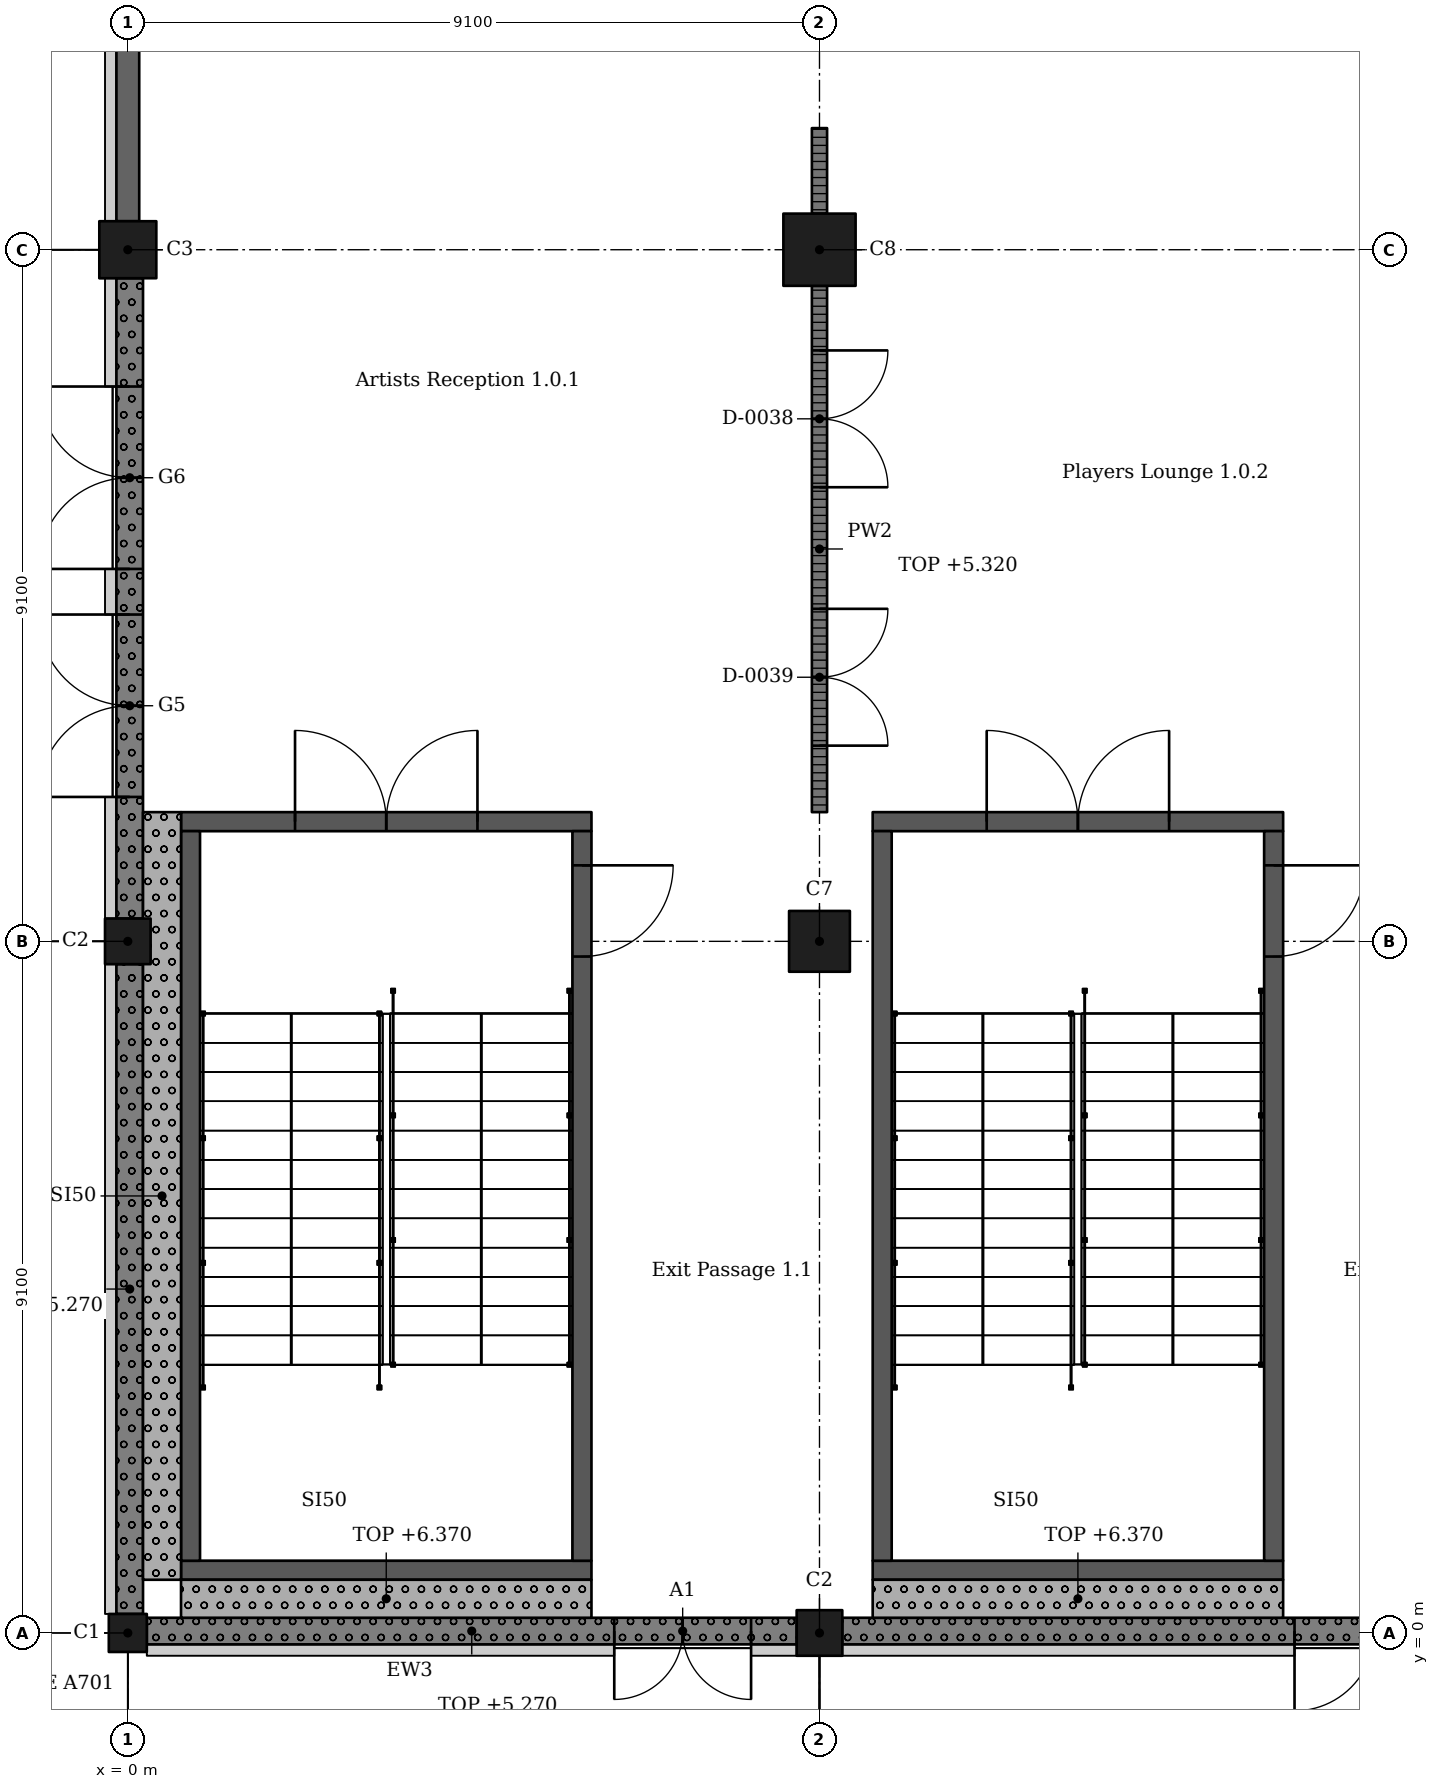
"""IFC4 building model, lengths in metres.
Left out: names, types, materials, properties, quantities, classifications, styles, units other than length and angle.
Written with IfcOpenShell. Run it as: python <this file> out.ifc"""

import sys

from ifc_helpers import new_model, si_unit, direction, frame, frame_2d, origin, origin_2d, place, context, subcontext, project, spatial, rectangle, extrude, element, fill, save


model = new_model("IFC4")
c1 = context("Model", 3, precision=1e-05, world=origin(), true_north=direction((0.0, 1.0)))
c2 = subcontext(c1, "Body", "Model", "MODEL_VIEW")
j1 = project(units=[si_unit("LENGTHUNIT", "METRE"), si_unit("PLANEANGLEUNIT", "RADIAN")], contexts=[c1])
p1 = place(None, origin())
s1 = spatial("IfcSite", under=j1, at=p1, CompositionType="ELEMENT")
p2 = place(p1, origin())
s2 = spatial("IfcBuilding", under=s1, at=p2, CompositionType="ELEMENT")
p3 = place(p2, origin())
s3 = spatial("IfcBuildingStorey", under=s2, at=p3, CompositionType="ELEMENT", Elevation=0.0)
p4 = place(p3, frame((0.0, 0.0, -0.4), z_axis=(0.0, 0.0, 1.0), x_axis=(1.0, 0.0, 0.0)))
e1 = element("IfcColumn", 1, at=p4, inside=s3, PredefinedType="COLUMN", context=c2, shape_type="SweptSolid", body=[
    extrude(rectangle(XDim=0.5, YDim=0.5, at=origin_2d()), origin(), (0.0, 0.0, 1.0), 6.77),
])
p5 = place(p3, frame((0.0, 9.1, -0.4), z_axis=(0.0, 0.0, 1.0), x_axis=(1.0, 0.0, 0.0)))
e2 = element("IfcColumn", 2, at=p5, inside=s3, PredefinedType="COLUMN", context=c2, shape_type="SweptSolid", body=[
    extrude(rectangle(XDim=0.6, YDim=0.6, at=origin_2d()), origin(), (0.0, 0.0, 1.0), 6.77),
])
p6 = place(p3, frame((0.0, 18.2, -0.4), z_axis=(0.0, 0.0, 1.0), x_axis=(1.0, 0.0, 0.0)))
e3 = element("IfcColumn", 3, at=p6, inside=s3, PredefinedType="COLUMN", context=c2, shape_type="SweptSolid", body=[
    extrude(rectangle(XDim=0.75, YDim=0.75, at=origin_2d()), origin(), (0.0, 0.0, 1.0), 6.77),
])
p7 = place(p3, frame((9.1, 0.0, -0.4), z_axis=(0.0, 0.0, 1.0), x_axis=(1.0, 0.0, 0.0)))
e4 = element("IfcColumn", 4, at=p7, inside=s3, PredefinedType="COLUMN", context=c2, shape_type="SweptSolid", body=[
    extrude(rectangle(XDim=0.6, YDim=0.6, at=origin_2d()), origin(), (0.0, 0.0, 1.0), 6.77),
])
p8 = place(p3, frame((9.1, 9.1, -0.4), z_axis=(0.0, 0.0, 1.0), x_axis=(1.0, 0.0, 0.0)))
e5 = element("IfcColumn", 5, at=p8, inside=s3, PredefinedType="COLUMN", context=c2, shape_type="SweptSolid", body=[
    extrude(rectangle(XDim=0.8, YDim=0.8, at=origin_2d()), origin(), (0.0, 0.0, 1.0), 6.77),
])
p9 = place(p3, frame((9.1, 18.2, -0.4), z_axis=(0.0, 0.0, 1.0), x_axis=(1.0, 0.0, 0.0)))
e6 = element("IfcColumn", 6, at=p9, inside=s3, PredefinedType="COLUMN", context=c2, shape_type="SweptSolid", body=[
    extrude(rectangle(XDim=0.95, YDim=0.95, at=origin_2d()), origin(), (0.0, 0.0, 1.0), 6.77),
])
p10 = place(p3, frame((6.1, 0.825, -0.4), z_axis=(0.0, 0.0, 1.0), x_axis=(-1.0, 0.0, 0.0)))
e7 = element("IfcWall", 7, at=p10, inside=s3, PredefinedType="SHEAR", context=c2, shape_type="SweptSolid", body=[
    extrude(rectangle(XDim=5.4, YDim=0.25, at=frame_2d((2.7, 0.0))), origin(), (0.0, 0.0, 1.0), 6.77),
])
p11 = place(p3, frame((6.1, 10.675, -0.4), z_axis=(0.0, 0.0, 1.0), x_axis=(-1.0, 0.0, 0.0)))
e8 = element("IfcWall", 8, at=p11, inside=s3, PredefinedType="SHEAR", context=c2, shape_type="SweptSolid", body=[
    extrude(rectangle(XDim=5.4, YDim=0.25, at=frame_2d((2.7, 0.0))), origin(), (0.0, 0.0, 1.0), 6.77),
])
p12 = place(p11, frame((1.5, 0.0, 0.4)))
e9 = element("IfcOpeningElement", 9, at=p12, cuts=e8, PredefinedType="OPENING", context=c2, shape_type="SweptSolid", body=[
    extrude(rectangle(XDim=2.4, YDim=2.1, at=frame_2d((1.2, 1.05))), frame((0.0, 0.135, 0.0), z_axis=(0.0, -1.0, 0.0), x_axis=(1.0, 0.0, 0.0)), (0.0, 0.0, 1.0), 0.27),
])
p13 = place(p3, frame((0.825, 10.55, -0.4), z_axis=(0.0, 0.0, 1.0), x_axis=(0.0, -1.0, 0.0)))
e10 = element("IfcWall", 10, at=p13, inside=s3, PredefinedType="SHEAR", context=c2, shape_type="SweptSolid", body=[
    extrude(rectangle(XDim=9.6, YDim=0.25, at=frame_2d((4.8, 0.0))), origin(), (0.0, 0.0, 1.0), 6.77),
])
p14 = place(p3, frame((5.975, 10.55, -0.4), z_axis=(0.0, 0.0, 1.0), x_axis=(0.0, -1.0, 0.0)))
e11 = element("IfcWall", 11, at=p14, inside=s3, PredefinedType="SHEAR", context=c2, shape_type="SweptSolid", body=[
    extrude(rectangle(XDim=9.6, YDim=0.25, at=frame_2d((4.8, 0.0))), origin(), (0.0, 0.0, 1.0), 6.77),
])
p15 = place(p14, frame((0.45, 0.0, 0.4)))
e12 = element("IfcOpeningElement", 12, at=p15, cuts=e11, PredefinedType="OPENING", context=c2, shape_type="SweptSolid", body=[
    extrude(rectangle(XDim=1.2, YDim=2.1, at=frame_2d((0.6, 1.05))), frame((0.0, 0.135, 0.0), z_axis=(0.0, -1.0, 0.0), x_axis=(1.0, 0.0, 0.0)), (0.0, 0.0, 1.0), 0.27),
])
p16 = place(p3, frame((15.2, 0.825, -0.4), z_axis=(0.0, 0.0, 1.0), x_axis=(-1.0, 0.0, 0.0)))
e13 = element("IfcWall", 13, at=p16, inside=s3, PredefinedType="SHEAR", context=c2, shape_type="SweptSolid", body=[
    extrude(rectangle(XDim=5.4, YDim=0.25, at=frame_2d((2.7, 0.0))), origin(), (0.0, 0.0, 1.0), 6.77),
])
p17 = place(p3, frame((15.2, 10.675, -0.4), z_axis=(0.0, 0.0, 1.0), x_axis=(-1.0, 0.0, 0.0)))
e14 = element("IfcWall", 14, at=p17, inside=s3, PredefinedType="SHEAR", context=c2, shape_type="SweptSolid", body=[
    extrude(rectangle(XDim=5.4, YDim=0.25, at=frame_2d((2.7, 0.0))), origin(), (0.0, 0.0, 1.0), 6.77),
])
p18 = place(p17, frame((1.5, 0.0, 0.4)))
e15 = element("IfcOpeningElement", 15, at=p18, cuts=e14, PredefinedType="OPENING", context=c2, shape_type="SweptSolid", body=[
    extrude(rectangle(XDim=2.4, YDim=2.1, at=frame_2d((1.2, 1.05))), frame((0.0, 0.135, 0.0), z_axis=(0.0, -1.0, 0.0), x_axis=(1.0, 0.0, 0.0)), (0.0, 0.0, 1.0), 0.27),
])
p19 = place(p3, frame((9.925, 10.55, -0.4), z_axis=(0.0, 0.0, 1.0), x_axis=(0.0, -1.0, 0.0)))
e16 = element("IfcWall", 16, at=p19, inside=s3, PredefinedType="SHEAR", context=c2, shape_type="SweptSolid", body=[
    extrude(rectangle(XDim=9.6, YDim=0.25, at=frame_2d((4.8, 0.0))), origin(), (0.0, 0.0, 1.0), 6.77),
])
p20 = place(p3, frame((15.075, 10.55, -0.4), z_axis=(0.0, 0.0, 1.0), x_axis=(0.0, -1.0, 0.0)))
e17 = element("IfcWall", 17, at=p20, inside=s3, PredefinedType="SHEAR", context=c2, shape_type="SweptSolid", body=[
    extrude(rectangle(XDim=9.6, YDim=0.25, at=frame_2d((4.8, 0.0))), origin(), (0.0, 0.0, 1.0), 6.77),
])
p21 = place(p20, frame((0.45, 0.0, 0.4)))
e18 = element("IfcOpeningElement", 18, at=p21, cuts=e17, PredefinedType="OPENING", context=c2, shape_type="SweptSolid", body=[
    extrude(rectangle(XDim=1.2, YDim=2.1, at=frame_2d((0.6, 1.05))), frame((0.0, 0.135, 0.0), z_axis=(0.0, -1.0, 0.0), x_axis=(1.0, 0.0, 0.0)), (0.0, 0.0, 1.0), 0.27),
])
p22 = place(p3, frame((0.25, 0.025, 0.0), z_axis=(0.0, 0.0, 1.0), x_axis=(1.0, 0.0, 0.0)))
e19 = element("IfcWall", 19, at=p22, inside=s3, PredefinedType="SOLIDWALL", context=c2, shape_type="SweptSolid", body=[
    extrude(rectangle(XDim=8.55, YDim=0.35, at=frame_2d((4.275, 0.0))), origin(), (0.0, 0.0, 1.0), 5.27),
])
p23 = place(p22, frame((6.15, 0.0, 0.0)))
e20 = element("IfcOpeningElement", 20, at=p23, cuts=e19, PredefinedType="OPENING", context=c2, shape_type="SweptSolid", body=[
    extrude(rectangle(XDim=1.8, YDim=2.4, at=frame_2d((0.9, 1.2))), frame((0.0, 0.185, 0.0), z_axis=(0.0, -1.0, 0.0), x_axis=(1.0, 0.0, 0.0)), (0.0, 0.0, 1.0), 0.37),
])
p24 = place(p3, frame((9.4, 0.025, 0.0), z_axis=(0.0, 0.0, 1.0), x_axis=(1.0, 0.0, 0.0)))
e21 = element("IfcWall", 21, at=p24, inside=s3, PredefinedType="SOLIDWALL", context=c2, shape_type="SweptSolid", body=[
    extrude(rectangle(XDim=8.5, YDim=0.35, at=frame_2d((4.25, 0.0))), origin(), (0.0, 0.0, 1.0), 5.27),
])
p25 = place(p24, frame((5.95, 0.0, 0.0)))
e22 = element("IfcOpeningElement", 22, at=p25, cuts=e21, PredefinedType="OPENING", context=c2, shape_type="SweptSolid", body=[
    extrude(rectangle(XDim=2.1, YDim=2.4, at=frame_2d((1.05, 1.2))), frame((0.0, 0.185, 0.0), z_axis=(0.0, -1.0, 0.0), x_axis=(1.0, 0.0, 0.0)), (0.0, 0.0, 1.0), 0.37),
])
p26 = place(p3, frame((0.0, 26.925, 0.0), z_axis=(0.0, 0.0, 1.0), x_axis=(0.0, -1.0, 0.0)))
e23 = element("IfcWall", 23, at=p26, inside=s3, PredefinedType="SOLIDWALL", context=c2, shape_type="SweptSolid", body=[
    extrude(rectangle(XDim=8.35, YDim=0.3, at=frame_2d((4.175, 0.0))), origin(), (0.0, 0.0, 1.0), 5.32),
])
p27 = place(p3, frame((0.025, 17.825, 0.0), z_axis=(0.0, 0.0, 1.0), x_axis=(0.0, -1.0, 0.0)))
e24 = element("IfcWall", 24, at=p27, inside=s3, PredefinedType="SOLIDWALL", context=c2, shape_type="SweptSolid", body=[
    extrude(rectangle(XDim=8.425, YDim=0.35, at=frame_2d((4.212, 0.0))), origin(), (0.0, 0.0, 1.0), 5.27),
])
p28 = place(p27, frame((4.425, 0.0, 0.0)))
e25 = element("IfcOpeningElement", 25, at=p28, cuts=e24, PredefinedType="OPENING", context=c2, shape_type="SweptSolid", body=[
    extrude(rectangle(XDim=2.4, YDim=2.4, at=frame_2d((1.2, 1.2))), frame((0.0, 0.185, 0.0), z_axis=(0.0, -1.0, 0.0), x_axis=(1.0, 0.0, 0.0)), (0.0, 0.0, 1.0), 0.37),
])
p29 = place(p27, frame((1.425, 0.0, 0.0)))
e26 = element("IfcOpeningElement", 26, at=p29, cuts=e24, PredefinedType="OPENING", context=c2, shape_type="SweptSolid", body=[
    extrude(rectangle(XDim=2.4, YDim=2.4, at=frame_2d((1.2, 1.2))), frame((0.0, 0.185, 0.0), z_axis=(0.0, -1.0, 0.0), x_axis=(1.0, 0.0, 0.0)), (0.0, 0.0, 1.0), 0.37),
])
p30 = place(p3, frame((0.025, 8.8, 0.0), z_axis=(0.0, 0.0, 1.0), x_axis=(0.0, -1.0, 0.0)))
e27 = element("IfcWall", 27, at=p30, inside=s3, PredefinedType="SOLIDWALL", context=c2, shape_type="SweptSolid", body=[
    extrude(rectangle(XDim=8.55, YDim=0.35, at=frame_2d((4.275, 0.0))), origin(), (0.0, 0.0, 1.0), 5.27),
])
p31 = place(p3, frame((0.7, 0.45, 0.0), z_axis=(0.0, 0.0, 1.0), x_axis=(1.0, 0.0, 0.0)))
e28 = element("IfcWall", 28, at=p31, inside=s3, PredefinedType="SOLIDWALL", context=c2, shape_type="SweptSolid", body=[
    extrude(rectangle(XDim=5.4, YDim=0.5, at=frame_2d((2.7, 0.0))), origin(), (0.0, 0.0, 1.0), 6.37),
])
p32 = place(p3, frame((0.45, 0.7, 0.0), z_axis=(0.0, 0.0, 1.0), x_axis=(0.0, 1.0, 0.0)))
e29 = element("IfcWall", 29, at=p32, inside=s3, PredefinedType="SOLIDWALL", context=c2, shape_type="SweptSolid", body=[
    extrude(rectangle(XDim=10.1, YDim=0.5, at=frame_2d((5.05, 0.0))), origin(), (0.0, 0.0, 1.0), 6.02),
])
p33 = place(p3, frame((9.8, 0.45, 0.0), z_axis=(0.0, 0.0, 1.0), x_axis=(1.0, 0.0, 0.0)))
e30 = element("IfcWall", 30, at=p33, inside=s3, PredefinedType="SOLIDWALL", context=c2, shape_type="SweptSolid", body=[
    extrude(rectangle(XDim=5.4, YDim=0.5, at=frame_2d((2.7, 0.0))), origin(), (0.0, 0.0, 1.0), 6.37),
])
p34 = place(p3, frame((9.1, 17.725, 0.0), z_axis=(0.0, 0.0, 1.0), x_axis=(0.0, -1.0, 0.0)))
e31 = element("IfcWall", 31, at=p34, inside=s3, PredefinedType="PARTITIONING", context=c2, shape_type="SweptSolid", body=[
    extrude(rectangle(XDim=6.925, YDim=0.2, at=frame_2d((3.462, 0.0))), origin(), (0.0, 0.0, 1.0), 5.32),
])
p35 = place(p34, frame((0.85, 0.0, 0.0)))
e32 = element("IfcOpeningElement", 32, at=p35, cuts=e31, PredefinedType="OPENING", context=c2, shape_type="SweptSolid", body=[
    extrude(rectangle(XDim=1.8, YDim=2.4, at=frame_2d((0.9, 1.2))), frame((0.0, 0.11, 0.0), z_axis=(0.0, -1.0, 0.0), x_axis=(1.0, 0.0, 0.0)), (0.0, 0.0, 1.0), 0.22),
])
p36 = place(p34, frame((4.25, 0.0, 0.0)))
e33 = element("IfcOpeningElement", 33, at=p36, cuts=e31, PredefinedType="OPENING", context=c2, shape_type="SweptSolid", body=[
    extrude(rectangle(XDim=1.8, YDim=2.4, at=frame_2d((0.9, 1.2))), frame((0.0, 0.11, 0.0), z_axis=(0.0, -1.0, 0.0), x_axis=(1.0, 0.0, 0.0)), (0.0, 0.0, 1.0), 0.22),
])
p37 = place(p3, frame((9.1, 19.8, 0.0), z_axis=(0.0, 0.0, 1.0), x_axis=(0.0, -1.0, 0.0)))
e34 = element("IfcWall", 34, at=p37, inside=s3, PredefinedType="PARTITIONING", context=c2, shape_type="SweptSolid", body=[
    extrude(rectangle(XDim=1.125, YDim=0.2, at=frame_2d((0.562, 0.0))), origin(), (0.0, 0.0, 1.0), 5.32),
])
p38 = place(p23, frame((1.8, 0.0, 0.0), z_axis=(0.0, 0.0, 1.0), x_axis=(-1.0, 0.0, 0.0)))
e35 = element("IfcDoor", 35, at=p38, inside=s3, OperationType="DOUBLE_DOOR_SINGLE_SWING", PredefinedType="DOOR", context=c2, shape_type="SweptSolid", body=[
    extrude(rectangle(XDim=1.8, YDim=2.4, at=frame_2d((0.9, 1.2))), frame((0.0, 0.025, 0.0), z_axis=(0.0, -1.0, 0.0), x_axis=(1.0, 0.0, 0.0)), (0.0, 0.0, 1.0), 0.05),
])
fill(e20, e35)
p39 = place(p25, frame((2.1, 0.0, 0.0), z_axis=(0.0, 0.0, 1.0), x_axis=(-1.0, 0.0, 0.0)))
e36 = element("IfcDoor", 36, at=p39, inside=s3, OperationType="DOUBLE_DOOR_SINGLE_SWING", PredefinedType="DOOR", context=c2, shape_type="SweptSolid", body=[
    extrude(rectangle(XDim=2.1, YDim=2.4, at=frame_2d((1.05, 1.2))), frame((0.0, 0.025, 0.0), z_axis=(0.0, -1.0, 0.0), x_axis=(1.0, 0.0, 0.0)), (0.0, 0.0, 1.0), 0.05),
])
fill(e22, e36)
p40 = place(p28, frame((2.4, 0.0, 0.0), z_axis=(0.0, 0.0, 1.0), x_axis=(-1.0, 0.0, 0.0)))
e37 = element("IfcDoor", 37, at=p40, inside=s3, OperationType="DOUBLE_DOOR_SINGLE_SWING", PredefinedType="DOOR", context=c2, shape_type="SweptSolid", body=[
    extrude(rectangle(XDim=2.4, YDim=2.4, at=frame_2d((1.2, 1.2))), frame((0.0, 0.025, 0.0), z_axis=(0.0, -1.0, 0.0), x_axis=(1.0, 0.0, 0.0)), (0.0, 0.0, 1.0), 0.05),
])
fill(e25, e37)
p41 = place(p29, frame((2.4, 0.0, 0.0), z_axis=(0.0, 0.0, 1.0), x_axis=(-1.0, 0.0, 0.0)))
e38 = element("IfcDoor", 38, at=p41, inside=s3, OperationType="DOUBLE_DOOR_SINGLE_SWING", PredefinedType="DOOR", context=c2, shape_type="SweptSolid", body=[
    extrude(rectangle(XDim=2.4, YDim=2.4, at=frame_2d((1.2, 1.2))), frame((0.0, 0.025, 0.0), z_axis=(0.0, -1.0, 0.0), x_axis=(1.0, 0.0, 0.0)), (0.0, 0.0, 1.0), 0.05),
])
fill(e26, e38)
p42 = place(p35, origin())
e39 = element("IfcDoor", 39, at=p42, inside=s3, OperationType="DOUBLE_DOOR_SINGLE_SWING", PredefinedType="DOOR", context=c2, shape_type="SweptSolid", body=[
    extrude(rectangle(XDim=1.8, YDim=2.4, at=frame_2d((0.9, 1.2))), frame((0.0, 0.025, 0.0), z_axis=(0.0, -1.0, 0.0), x_axis=(1.0, 0.0, 0.0)), (0.0, 0.0, 1.0), 0.05),
])
fill(e32, e39)
p43 = place(p36, origin())
e40 = element("IfcDoor", 40, at=p43, inside=s3, OperationType="DOUBLE_DOOR_SINGLE_SWING", PredefinedType="DOOR", context=c2, shape_type="SweptSolid", body=[
    extrude(rectangle(XDim=1.8, YDim=2.4, at=frame_2d((0.9, 1.2))), frame((0.0, 0.025, 0.0), z_axis=(0.0, -1.0, 0.0), x_axis=(1.0, 0.0, 0.0)), (0.0, 0.0, 1.0), 0.05),
])
fill(e33, e40)
p44 = place(p12, origin())
e41 = element("IfcDoor", 41, at=p44, inside=s3, OperationType="DOUBLE_DOOR_SINGLE_SWING", PredefinedType="DOOR", context=c2, shape_type="SweptSolid", body=[
    extrude(rectangle(XDim=2.4, YDim=2.1, at=frame_2d((1.2, 1.05))), frame((0.0, 0.025, 0.0), z_axis=(0.0, -1.0, 0.0), x_axis=(1.0, 0.0, 0.0)), (0.0, 0.0, 1.0), 0.05),
])
fill(e9, e41)
p45 = place(p18, origin())
e42 = element("IfcDoor", 42, at=p45, inside=s3, OperationType="DOUBLE_DOOR_SINGLE_SWING", PredefinedType="DOOR", context=c2, shape_type="SweptSolid", body=[
    extrude(rectangle(XDim=2.4, YDim=2.1, at=frame_2d((1.2, 1.05))), frame((0.0, 0.025, 0.0), z_axis=(0.0, -1.0, 0.0), x_axis=(1.0, 0.0, 0.0)), (0.0, 0.0, 1.0), 0.05),
])
fill(e15, e42)
p46 = place(p15, origin())
e43 = element("IfcDoor", 43, at=p46, inside=s3, OperationType="SINGLE_SWING_RIGHT", PredefinedType="DOOR", context=c2, shape_type="SweptSolid", body=[
    extrude(rectangle(XDim=1.2, YDim=2.1, at=frame_2d((0.6, 1.05))), frame((0.0, 0.025, 0.0), z_axis=(0.0, -1.0, 0.0), x_axis=(1.0, 0.0, 0.0)), (0.0, 0.0, 1.0), 0.05),
])
fill(e12, e43)
p47 = place(p21, origin())
e44 = element("IfcDoor", 44, at=p47, inside=s3, OperationType="SINGLE_SWING_RIGHT", PredefinedType="DOOR", context=c2, shape_type="SweptSolid", body=[
    extrude(rectangle(XDim=1.2, YDim=2.1, at=frame_2d((0.6, 1.05))), frame((0.0, 0.025, 0.0), z_axis=(0.0, -1.0, 0.0), x_axis=(1.0, 0.0, 0.0)), (0.0, 0.0, 1.0), 0.05),
])
fill(e18, e44)
save(model, sys.argv[1])
